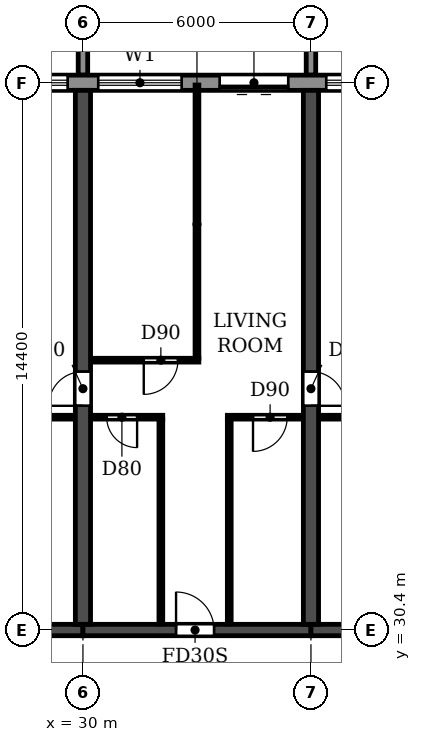
"""IFC4 building model, lengths in metres.
Left out: names, types, materials, properties, quantities, classifications, styles, units other than length and angle.
Written with IfcOpenShell. Run it as: python <this file> out.ifc"""

import sys

from ifc_helpers import new_model, si_unit, direction, frame, frame_2d, origin, place, context, subcontext, project, spatial, polyline, rectangle, outline, extrude, source, transform, mapped, element, fill, save


model = new_model("IFC4")
c1 = context("Model", 3, precision=1e-05, world=origin(), true_north=direction((0.0, 1.0)))
c2 = subcontext(c1, "Body", "Model", "MODEL_VIEW")
j1 = project(units=[si_unit("LENGTHUNIT", "METRE"), si_unit("PLANEANGLEUNIT", "RADIAN")], contexts=[c1])
p1 = place(None, origin())
s1 = spatial("IfcSite", under=j1, at=p1, CompositionType="ELEMENT")
p2 = place(p1, origin())
s2 = spatial("IfcBuilding", under=s1, at=p2, CompositionType="ELEMENT")
p3 = place(p2, frame((0.0, 0.0, 49.8)))
s3 = spatial("IfcBuildingStorey", under=s2, at=p3, CompositionType="ELEMENT", Elevation=49.8)
p4 = place(p3, frame((30.0, 30.55, 0.0), z_axis=(0.0, 0.0, 1.0), x_axis=(0.0, 1.0, 0.0)))
e1 = element("IfcWall", 1, at=p4, inside=s3, PredefinedType="SHEAR", context=c2, shape_type="SweptSolid", body=[
    extrude(rectangle(XDim=14.05, YDim=0.4, at=frame_2d((7.025, 0.0))), origin(), (0.0, 0.0, 1.0), 3.0),
])
p5 = place(p4, frame((5.75, 0.0, 0.0)))
e2 = element("IfcOpeningElement", 2, at=p5, cuts=e1, PredefinedType="OPENING", context=c2, shape_type="SweptSolid", body=[
    extrude(rectangle(XDim=0.9, YDim=2.1, at=frame_2d((0.45, 1.05))), frame((0.0, 0.21, 0.0), z_axis=(0.0, -1.0, 0.0), x_axis=(1.0, 0.0, 0.0)), (0.0, 0.0, 1.0), 0.42),
])
p6 = place(p3, frame((36.0, 30.55, 0.0), z_axis=(0.0, 0.0, 1.0), x_axis=(0.0, 1.0, 0.0)))
e3 = element("IfcWall", 3, at=p6, inside=s3, PredefinedType="SHEAR", context=c2, shape_type="SweptSolid", body=[
    extrude(rectangle(XDim=14.05, YDim=0.4, at=frame_2d((7.025, 0.0))), origin(), (0.0, 0.0, 1.0), 3.0),
])
p7 = place(p6, frame((5.75, 0.0, 0.0)))
e4 = element("IfcOpeningElement", 4, at=p7, cuts=e3, PredefinedType="OPENING", context=c2, shape_type="SweptSolid", body=[
    extrude(rectangle(XDim=0.9, YDim=2.1, at=frame_2d((0.45, 1.05))), frame((0.0, 0.21, 0.0), z_axis=(0.0, -1.0, 0.0), x_axis=(1.0, 0.0, 0.0)), (0.0, 0.0, 1.0), 0.42),
])
p8 = place(p3, frame((24.0, 30.4, 0.0), z_axis=(0.0, 0.0, 1.0), x_axis=(1.0, 0.0, 0.0)))
e5 = element("IfcWall", 5, at=p8, inside=s3, PredefinedType="SHEAR", context=c2, shape_type="SweptSolid", body=[
    extrude(rectangle(XDim=6.0, YDim=0.3, at=frame_2d((3.0, 0.0))), origin(), (0.0, 0.0, 1.0), 2.4),
])
p9 = place(p3, frame((30.0, 30.4, 0.0), z_axis=(0.0, 0.0, 1.0), x_axis=(1.0, 0.0, 0.0)))
e6 = element("IfcWall", 6, at=p9, inside=s3, PredefinedType="SHEAR", context=c2, shape_type="SweptSolid", body=[
    extrude(rectangle(XDim=6.0, YDim=0.3, at=frame_2d((3.0, 0.0))), origin(), (0.0, 0.0, 1.0), 2.4),
])
p10 = place(p9, frame((2.45, 0.0, 0.0)))
e7 = element("IfcOpeningElement", 7, at=p10, cuts=e6, PredefinedType="OPENING", context=c2, shape_type="SweptSolid", body=[
    extrude(rectangle(XDim=1.0, YDim=2.1, at=frame_2d((0.5, 1.05))), frame((0.0, 0.16, 0.0), z_axis=(0.0, -1.0, 0.0), x_axis=(1.0, 0.0, 0.0)), (0.0, 0.0, 1.0), 0.32),
])
p11 = place(p3, frame((36.0, 30.4, 0.0), z_axis=(0.0, 0.0, 1.0), x_axis=(1.0, 0.0, 0.0)))
e8 = element("IfcWall", 8, at=p11, inside=s3, PredefinedType="SHEAR", context=c2, shape_type="SweptSolid", body=[
    extrude(rectangle(XDim=6.0, YDim=0.3, at=frame_2d((3.0, 0.0))), origin(), (0.0, 0.0, 1.0), 2.4),
])
p12 = place(p3, frame((97.317, 44.8, 0.0), z_axis=(0.0, 0.0, 1.0), x_axis=(-1.0, 0.0, 0.0)))
e9 = element("IfcWall", 9, at=p12, inside=s3, PredefinedType="STANDARD", context=c2, shape_type="SweptSolid", body=[
    extrude(rectangle(XDim=92.634, YDim=0.4, at=frame_2d((46.317, 0.0))), origin(), (0.0, 0.0, 1.0), 3.0),
])
p13 = place(p12, frame((88.917, 0.0, 0.0)))
e10 = element("IfcOpeningElement", 10, at=p13, cuts=e9, PredefinedType="OPENING", context=c2, shape_type="SweptSolid", body=[
    extrude(rectangle(XDim=1.8, YDim=2.4, at=frame_2d((0.9, 1.2))), frame((0.0, 0.21, 0.0), z_axis=(0.0, -1.0, 0.0), x_axis=(1.0, 0.0, 0.0)), (0.0, 0.0, 1.0), 0.42),
])
p14 = place(p12, frame((85.717, 0.0, 0.9)))
e11 = element("IfcOpeningElement", 11, at=p14, cuts=e9, PredefinedType="OPENING", context=c2, shape_type="SweptSolid", body=[
    extrude(rectangle(XDim=2.2, YDim=1.5, at=frame_2d((1.1, 0.75))), frame((0.0, 0.21, 0.0), z_axis=(0.0, -1.0, 0.0), x_axis=(1.0, 0.0, 0.0)), (0.0, 0.0, 1.0), 0.42),
])
p15 = place(p12, frame((82.717, 0.0, 0.9)))
e12 = element("IfcOpeningElement", 12, at=p15, cuts=e9, PredefinedType="OPENING", context=c2, shape_type="SweptSolid", body=[
    extrude(rectangle(XDim=2.2, YDim=1.5, at=frame_2d((1.1, 0.75))), frame((0.0, 0.21, 0.0), z_axis=(0.0, -1.0, 0.0), x_axis=(1.0, 0.0, 0.0)), (0.0, 0.0, 1.0), 0.42),
])
p16 = place(p12, frame((79.717, 0.0, 0.9)))
e13 = element("IfcOpeningElement", 13, at=p16, cuts=e9, PredefinedType="OPENING", context=c2, shape_type="SweptSolid", body=[
    extrude(rectangle(XDim=2.2, YDim=1.5, at=frame_2d((1.1, 0.75))), frame((0.0, 0.21, 0.0), z_axis=(0.0, -1.0, 0.0), x_axis=(1.0, 0.0, 0.0)), (0.0, 0.0, 1.0), 0.42),
])
p17 = place(p12, frame((76.717, 0.0, 0.9)))
e14 = element("IfcOpeningElement", 14, at=p17, cuts=e9, PredefinedType="OPENING", context=c2, shape_type="SweptSolid", body=[
    extrude(rectangle(XDim=2.2, YDim=1.5, at=frame_2d((1.1, 0.75))), frame((0.0, 0.21, 0.0), z_axis=(0.0, -1.0, 0.0), x_axis=(1.0, 0.0, 0.0)), (0.0, 0.0, 1.0), 0.42),
])
p18 = place(p12, frame((73.917, 0.0, 0.0)))
e15 = element("IfcOpeningElement", 15, at=p18, cuts=e9, PredefinedType="OPENING", context=c2, shape_type="SweptSolid", body=[
    extrude(rectangle(XDim=1.8, YDim=2.4, at=frame_2d((0.9, 1.2))), frame((0.0, 0.21, 0.0), z_axis=(0.0, -1.0, 0.0), x_axis=(1.0, 0.0, 0.0)), (0.0, 0.0, 1.0), 0.42),
])
p19 = place(p12, frame((70.717, 0.0, 0.9)))
e16 = element("IfcOpeningElement", 16, at=p19, cuts=e9, PredefinedType="OPENING", context=c2, shape_type="SweptSolid", body=[
    extrude(rectangle(XDim=2.2, YDim=1.5, at=frame_2d((1.1, 0.75))), frame((0.0, 0.21, 0.0), z_axis=(0.0, -1.0, 0.0), x_axis=(1.0, 0.0, 0.0)), (0.0, 0.0, 1.0), 0.42),
])
p20 = place(p12, frame((67.717, 0.0, 0.9)))
e17 = element("IfcOpeningElement", 17, at=p20, cuts=e9, PredefinedType="OPENING", context=c2, shape_type="SweptSolid", body=[
    extrude(rectangle(XDim=2.2, YDim=1.5, at=frame_2d((1.1, 0.75))), frame((0.0, 0.21, 0.0), z_axis=(0.0, -1.0, 0.0), x_axis=(1.0, 0.0, 0.0)), (0.0, 0.0, 1.0), 0.42),
])
p21 = place(p12, frame((64.717, 0.0, 0.9)))
e18 = element("IfcOpeningElement", 18, at=p21, cuts=e9, PredefinedType="OPENING", context=c2, shape_type="SweptSolid", body=[
    extrude(rectangle(XDim=2.2, YDim=1.5, at=frame_2d((1.1, 0.75))), frame((0.0, 0.21, 0.0), z_axis=(0.0, -1.0, 0.0), x_axis=(1.0, 0.0, 0.0)), (0.0, 0.0, 1.0), 0.42),
])
p22 = place(p12, frame((61.917, 0.0, 0.0)))
e19 = element("IfcOpeningElement", 19, at=p22, cuts=e9, PredefinedType="OPENING", context=c2, shape_type="SweptSolid", body=[
    extrude(rectangle(XDim=1.8, YDim=2.4, at=frame_2d((0.9, 1.2))), frame((0.0, 0.21, 0.0), z_axis=(0.0, -1.0, 0.0), x_axis=(1.0, 0.0, 0.0)), (0.0, 0.0, 1.0), 0.42),
])
p23 = place(p12, frame((58.717, 0.0, 0.9)))
e20 = element("IfcOpeningElement", 20, at=p23, cuts=e9, PredefinedType="OPENING", context=c2, shape_type="SweptSolid", body=[
    extrude(rectangle(XDim=2.2, YDim=1.5, at=frame_2d((1.1, 0.75))), frame((0.0, 0.21, 0.0), z_axis=(0.0, -1.0, 0.0), x_axis=(1.0, 0.0, 0.0)), (0.0, 0.0, 1.0), 0.42),
])
p24 = place(p12, frame((55.717, 0.0, 0.9)))
e21 = element("IfcOpeningElement", 21, at=p24, cuts=e9, PredefinedType="OPENING", context=c2, shape_type="SweptSolid", body=[
    extrude(rectangle(XDim=2.2, YDim=1.5, at=frame_2d((1.1, 0.75))), frame((0.0, 0.21, 0.0), z_axis=(0.0, -1.0, 0.0), x_axis=(1.0, 0.0, 0.0)), (0.0, 0.0, 1.0), 0.42),
])
p25 = place(p12, frame((52.717, 0.0, 0.9)))
e22 = element("IfcOpeningElement", 22, at=p25, cuts=e9, PredefinedType="OPENING", context=c2, shape_type="SweptSolid", body=[
    extrude(rectangle(XDim=2.2, YDim=1.5, at=frame_2d((1.1, 0.75))), frame((0.0, 0.21, 0.0), z_axis=(0.0, -1.0, 0.0), x_axis=(1.0, 0.0, 0.0)), (0.0, 0.0, 1.0), 0.42),
])
p26 = place(p12, frame((49.917, 0.0, 0.0)))
e23 = element("IfcOpeningElement", 23, at=p26, cuts=e9, PredefinedType="OPENING", context=c2, shape_type="SweptSolid", body=[
    extrude(rectangle(XDim=1.8, YDim=2.4, at=frame_2d((0.9, 1.2))), frame((0.0, 0.21, 0.0), z_axis=(0.0, -1.0, 0.0), x_axis=(1.0, 0.0, 0.0)), (0.0, 0.0, 1.0), 0.42),
])
p27 = place(p12, frame((46.717, 0.0, 0.9)))
e24 = element("IfcOpeningElement", 24, at=p27, cuts=e9, PredefinedType="OPENING", context=c2, shape_type="SweptSolid", body=[
    extrude(rectangle(XDim=2.2, YDim=1.5, at=frame_2d((1.1, 0.75))), frame((0.0, 0.21, 0.0), z_axis=(0.0, -1.0, 0.0), x_axis=(1.0, 0.0, 0.0)), (0.0, 0.0, 1.0), 0.42),
])
p28 = place(p12, frame((43.717, 0.0, 0.9)))
e25 = element("IfcOpeningElement", 25, at=p28, cuts=e9, PredefinedType="OPENING", context=c2, shape_type="SweptSolid", body=[
    extrude(rectangle(XDim=2.2, YDim=1.5, at=frame_2d((1.1, 0.75))), frame((0.0, 0.21, 0.0), z_axis=(0.0, -1.0, 0.0), x_axis=(1.0, 0.0, 0.0)), (0.0, 0.0, 1.0), 0.42),
])
p29 = place(p12, frame((40.717, 0.0, 0.9)))
e26 = element("IfcOpeningElement", 26, at=p29, cuts=e9, PredefinedType="OPENING", context=c2, shape_type="SweptSolid", body=[
    extrude(rectangle(XDim=2.2, YDim=1.5, at=frame_2d((1.1, 0.75))), frame((0.0, 0.21, 0.0), z_axis=(0.0, -1.0, 0.0), x_axis=(1.0, 0.0, 0.0)), (0.0, 0.0, 1.0), 0.42),
])
p30 = place(p12, frame((37.917, 0.0, 0.0)))
e27 = element("IfcOpeningElement", 27, at=p30, cuts=e9, PredefinedType="OPENING", context=c2, shape_type="SweptSolid", body=[
    extrude(rectangle(XDim=1.8, YDim=2.4, at=frame_2d((0.9, 1.2))), frame((0.0, 0.21, 0.0), z_axis=(0.0, -1.0, 0.0), x_axis=(1.0, 0.0, 0.0)), (0.0, 0.0, 1.0), 0.42),
])
p31 = place(p12, frame((34.717, 0.0, 0.9)))
e28 = element("IfcOpeningElement", 28, at=p31, cuts=e9, PredefinedType="OPENING", context=c2, shape_type="SweptSolid", body=[
    extrude(rectangle(XDim=2.2, YDim=1.5, at=frame_2d((1.1, 0.75))), frame((0.0, 0.21, 0.0), z_axis=(0.0, -1.0, 0.0), x_axis=(1.0, 0.0, 0.0)), (0.0, 0.0, 1.0), 0.42),
])
p32 = place(p12, frame((31.717, 0.0, 0.9)))
e29 = element("IfcOpeningElement", 29, at=p32, cuts=e9, PredefinedType="OPENING", context=c2, shape_type="SweptSolid", body=[
    extrude(rectangle(XDim=2.2, YDim=1.5, at=frame_2d((1.1, 0.75))), frame((0.0, 0.21, 0.0), z_axis=(0.0, -1.0, 0.0), x_axis=(1.0, 0.0, 0.0)), (0.0, 0.0, 1.0), 0.42),
])
p33 = place(p12, frame((28.717, 0.0, 0.9)))
e30 = element("IfcOpeningElement", 30, at=p33, cuts=e9, PredefinedType="OPENING", context=c2, shape_type="SweptSolid", body=[
    extrude(rectangle(XDim=2.2, YDim=1.5, at=frame_2d((1.1, 0.75))), frame((0.0, 0.21, 0.0), z_axis=(0.0, -1.0, 0.0), x_axis=(1.0, 0.0, 0.0)), (0.0, 0.0, 1.0), 0.42),
])
p34 = place(p12, frame((25.917, 0.0, 0.0)))
e31 = element("IfcOpeningElement", 31, at=p34, cuts=e9, PredefinedType="OPENING", context=c2, shape_type="SweptSolid", body=[
    extrude(rectangle(XDim=1.8, YDim=2.4, at=frame_2d((0.9, 1.2))), frame((0.0, 0.21, 0.0), z_axis=(0.0, -1.0, 0.0), x_axis=(1.0, 0.0, 0.0)), (0.0, 0.0, 1.0), 0.42),
])
p35 = place(p12, frame((22.917, 0.0, 0.0)))
e32 = element("IfcOpeningElement", 32, at=p35, cuts=e9, PredefinedType="OPENING", context=c2, shape_type="SweptSolid", body=[
    extrude(rectangle(XDim=1.8, YDim=2.4, at=frame_2d((0.9, 1.2))), frame((0.0, 0.21, 0.0), z_axis=(0.0, -1.0, 0.0), x_axis=(1.0, 0.0, 0.0)), (0.0, 0.0, 1.0), 0.42),
])
p36 = place(p12, frame((19.717, 0.0, 0.9)))
e33 = element("IfcOpeningElement", 33, at=p36, cuts=e9, PredefinedType="OPENING", context=c2, shape_type="SweptSolid", body=[
    extrude(rectangle(XDim=2.2, YDim=1.5, at=frame_2d((1.1, 0.75))), frame((0.0, 0.21, 0.0), z_axis=(0.0, -1.0, 0.0), x_axis=(1.0, 0.0, 0.0)), (0.0, 0.0, 1.0), 0.42),
])
p37 = place(p12, frame((16.717, 0.0, 0.9)))
e34 = element("IfcOpeningElement", 34, at=p37, cuts=e9, PredefinedType="OPENING", context=c2, shape_type="SweptSolid", body=[
    extrude(rectangle(XDim=2.2, YDim=1.5, at=frame_2d((1.1, 0.75))), frame((0.0, 0.21, 0.0), z_axis=(0.0, -1.0, 0.0), x_axis=(1.0, 0.0, 0.0)), (0.0, 0.0, 1.0), 0.42),
])
p38 = place(p12, frame((13.717, 0.0, 0.9)))
e35 = element("IfcOpeningElement", 35, at=p38, cuts=e9, PredefinedType="OPENING", context=c2, shape_type="SweptSolid", body=[
    extrude(rectangle(XDim=2.2, YDim=1.5, at=frame_2d((1.1, 0.75))), frame((0.0, 0.21, 0.0), z_axis=(0.0, -1.0, 0.0), x_axis=(1.0, 0.0, 0.0)), (0.0, 0.0, 1.0), 0.42),
])
p39 = place(p12, frame((10.717, 0.0, 0.9)))
e36 = element("IfcOpeningElement", 36, at=p39, cuts=e9, PredefinedType="OPENING", context=c2, shape_type="SweptSolid", body=[
    extrude(rectangle(XDim=2.2, YDim=1.5, at=frame_2d((1.1, 0.75))), frame((0.0, 0.21, 0.0), z_axis=(0.0, -1.0, 0.0), x_axis=(1.0, 0.0, 0.0)), (0.0, 0.0, 1.0), 0.42),
])
p40 = place(p12, frame((7.917, 0.0, 0.0)))
e37 = element("IfcOpeningElement", 37, at=p40, cuts=e9, PredefinedType="OPENING", context=c2, shape_type="SweptSolid", body=[
    extrude(rectangle(XDim=1.8, YDim=2.4, at=frame_2d((0.9, 1.2))), frame((0.0, 0.21, 0.0), z_axis=(0.0, -1.0, 0.0), x_axis=(1.0, 0.0, 0.0)), (0.0, 0.0, 1.0), 0.42),
])
p41 = place(p12, frame((4.717, 0.0, 0.9)))
e38 = element("IfcOpeningElement", 38, at=p41, cuts=e9, PredefinedType="OPENING", context=c2, shape_type="SweptSolid", body=[
    extrude(rectangle(XDim=2.2, YDim=1.5, at=frame_2d((1.1, 0.75))), frame((0.0, 0.21, 0.0), z_axis=(0.0, -1.0, 0.0), x_axis=(1.0, 0.0, 0.0)), (0.0, 0.0, 1.0), 0.42),
])
p42 = place(p12, frame((1.917, 0.0, 0.0)))
e39 = element("IfcOpeningElement", 39, at=p42, cuts=e9, PredefinedType="OPENING", context=c2, shape_type="SweptSolid", body=[
    extrude(rectangle(XDim=1.8, YDim=2.4, at=frame_2d((0.9, 1.2))), frame((0.0, 0.21, 0.0), z_axis=(0.0, -1.0, 0.0), x_axis=(1.0, 0.0, 0.0)), (0.0, 0.0, 1.0), 0.42),
])
m1 = source(origin(), c2, "Body", "SweptSolid", [
    extrude(outline(polyline([(0.0, 0.0), (0.25, 0.0), (0.25, 3.1), (0.0, 3.1), (0.0, 0.0)])), origin(), (0.0, 0.0, 1.0), 3.1),
])
for number, where in (
    (40, (29.875, 45.0, 0.0)),
    (41, (35.875, 45.0, 0.0)),
):
    element("IfcWall", number, at=place(p3, frame(where)), inside=s3, PredefinedType="STANDARD", context=c2, shape_type="MappedRepresentation", body=[
        mapped(m1, transform((0.0, 0.0, 0.0))),
    ])
p43 = place(p3, frame((27.1, 36.0, 0.0), z_axis=(0.0, 0.0, 1.0), x_axis=(1.0, 0.0, 0.0)))
e42 = element("IfcWall", 42, at=p43, inside=s3, PredefinedType="PARTITIONING", context=c2, shape_type="SweptSolid", body=[
    extrude(rectangle(XDim=2.69, YDim=0.1, at=frame_2d((1.345, 0.0))), origin(), (0.0, 0.0, 1.0), 3.0),
])
p44 = place(p43, frame((1.0, 0.0, 0.0)))
e43 = element("IfcOpeningElement", 43, at=p44, cuts=e42, PredefinedType="OPENING", context=c2, shape_type="SweptSolid", body=[
    extrude(rectangle(XDim=0.8, YDim=2.1, at=frame_2d((0.4, 1.05))), frame((0.0, 0.06, 0.0), z_axis=(0.0, -1.0, 0.0), x_axis=(1.0, 0.0, 0.0)), (0.0, 0.0, 1.0), 0.12),
])
p45 = place(p3, frame((30.21, 36.0, 0.0), z_axis=(0.0, 0.0, 1.0), x_axis=(1.0, 0.0, 0.0)))
e44 = element("IfcWall", 44, at=p45, inside=s3, PredefinedType="PARTITIONING", context=c2, shape_type="SweptSolid", body=[
    extrude(rectangle(XDim=1.89, YDim=0.1, at=frame_2d((0.945, 0.0))), origin(), (0.0, 0.0, 1.0), 3.0),
])
p46 = place(p45, frame((0.415, 0.0, 0.0)))
e45 = element("IfcOpeningElement", 45, at=p46, cuts=e44, PredefinedType="OPENING", context=c2, shape_type="SweptSolid", body=[
    extrude(rectangle(XDim=0.8, YDim=2.1, at=frame_2d((0.4, 1.05))), frame((0.0, 0.06, 0.0), z_axis=(0.0, -1.0, 0.0), x_axis=(1.0, 0.0, 0.0)), (0.0, 0.0, 1.0), 0.12),
])
p47 = place(p3, frame((33.8, 36.0, 0.0), z_axis=(0.0, 0.0, 1.0), x_axis=(1.0, 0.0, 0.0)))
e46 = element("IfcWall", 46, at=p47, inside=s3, PredefinedType="PARTITIONING", context=c2, shape_type="SweptSolid", body=[
    extrude(rectangle(XDim=1.99, YDim=0.1, at=frame_2d((0.995, 0.0))), origin(), (0.0, 0.0, 1.0), 3.0),
])
p48 = place(p47, frame((0.675, 0.0, 0.0)))
e47 = element("IfcOpeningElement", 47, at=p48, cuts=e46, PredefinedType="OPENING", context=c2, shape_type="SweptSolid", body=[
    extrude(rectangle(XDim=0.9, YDim=2.1, at=frame_2d((0.45, 1.05))), frame((0.0, 0.06, 0.0), z_axis=(0.0, -1.0, 0.0), x_axis=(1.0, 0.0, 0.0)), (0.0, 0.0, 1.0), 0.12),
])
p49 = place(p3, frame((36.21, 36.0, 0.0), z_axis=(0.0, 0.0, 1.0), x_axis=(1.0, 0.0, 0.0)))
e48 = element("IfcWall", 48, at=p49, inside=s3, PredefinedType="PARTITIONING", context=c2, shape_type="SweptSolid", body=[
    extrude(rectangle(XDim=2.69, YDim=0.1, at=frame_2d((1.345, 0.0))), origin(), (0.0, 0.0, 1.0), 3.0),
])
p50 = place(p49, frame((0.89, 0.0, 0.0)))
e49 = element("IfcOpeningElement", 49, at=p50, cuts=e48, PredefinedType="OPENING", context=c2, shape_type="SweptSolid", body=[
    extrude(rectangle(XDim=0.8, YDim=2.1, at=frame_2d((0.4, 1.05))), frame((0.0, 0.06, 0.0), z_axis=(0.0, -1.0, 0.0), x_axis=(1.0, 0.0, 0.0)), (0.0, 0.0, 1.0), 0.12),
])
p51 = place(p3, frame((30.21, 37.5, 0.0), z_axis=(0.0, 0.0, 1.0), x_axis=(1.0, 0.0, 0.0)))
e50 = element("IfcWall", 50, at=p51, inside=s3, PredefinedType="PARTITIONING", context=c2, shape_type="SweptSolid", body=[
    extrude(rectangle(XDim=2.84, YDim=0.1, at=frame_2d((1.42, 0.0))), origin(), (0.0, 0.0, 1.0), 3.0),
])
p52 = place(p51, frame((1.39, 0.0, 0.0)))
e51 = element("IfcOpeningElement", 51, at=p52, cuts=e50, PredefinedType="OPENING", context=c2, shape_type="SweptSolid", body=[
    extrude(rectangle(XDim=0.9, YDim=2.1, at=frame_2d((0.45, 1.05))), frame((0.0, 0.06, 0.0), z_axis=(0.0, -1.0, 0.0), x_axis=(1.0, 0.0, 0.0)), (0.0, 0.0, 1.0), 0.12),
])
p53 = place(p3, frame((32.05, 30.56, 0.0), z_axis=(0.0, 0.0, 1.0), x_axis=(0.0, 1.0, 0.0)))
e52 = element("IfcWall", 52, at=p53, inside=s3, PredefinedType="PARTITIONING", context=c2, shape_type="SweptSolid", body=[
    extrude(rectangle(XDim=5.39, YDim=0.1, at=frame_2d((2.695, 0.0))), origin(), (0.0, 0.0, 1.0), 3.0),
])
p54 = place(p3, frame((33.0, 37.55, 0.0), z_axis=(0.0, 0.0, 1.0), x_axis=(0.0, 1.0, 0.0)))
e53 = element("IfcWall", 53, at=p54, inside=s3, PredefinedType="PARTITIONING", context=c2, shape_type="SweptSolid", body=[
    extrude(rectangle(XDim=7.19, YDim=0.1, at=frame_2d((3.595, 0.0))), origin(), (0.0, 0.0, 1.0), 3.0),
])
p55 = place(p3, frame((33.85, 30.56, 0.0), z_axis=(0.0, 0.0, 1.0), x_axis=(0.0, 1.0, 0.0)))
e54 = element("IfcWall", 54, at=p55, inside=s3, PredefinedType="PARTITIONING", context=c2, shape_type="SweptSolid", body=[
    extrude(rectangle(XDim=5.39, YDim=0.1, at=frame_2d((2.695, 0.0))), origin(), (0.0, 0.0, 1.0), 3.0),
])
p56 = place(p20, origin())
e55 = element("IfcWindow", 55, at=p56, inside=s3, PartitioningType="DOUBLE_PANEL_HORIZONTAL", PredefinedType="WINDOW", context=c2, shape_type="SweptSolid", body=[
    extrude(rectangle(XDim=2.2, YDim=1.5, at=frame_2d((1.1, 0.75))), frame((0.0, 0.03, 0.0), z_axis=(0.0, -1.0, 0.0), x_axis=(1.0, 0.0, 0.0)), (0.0, 0.0, 1.0), 0.06),
])
fill(e17, e55)
p57 = place(p21, origin())
e56 = element("IfcWindow", 56, at=p57, inside=s3, PartitioningType="DOUBLE_PANEL_HORIZONTAL", PredefinedType="WINDOW", context=c2, shape_type="SweptSolid", body=[
    extrude(rectangle(XDim=2.2, YDim=1.5, at=frame_2d((1.1, 0.75))), frame((0.0, 0.03, 0.0), z_axis=(0.0, -1.0, 0.0), x_axis=(1.0, 0.0, 0.0)), (0.0, 0.0, 1.0), 0.06),
])
fill(e18, e56)
p58 = place(p22, origin())
e57 = element("IfcDoor", 57, at=p58, inside=s3, OperationType="DOUBLE_DOOR_SLIDING", PredefinedType="DOOR", context=c2, shape_type="SweptSolid", body=[
    extrude(rectangle(XDim=1.8, YDim=2.4, at=frame_2d((0.9, 1.2))), frame((0.0, 0.025, 0.0), z_axis=(0.0, -1.0, 0.0), x_axis=(1.0, 0.0, 0.0)), (0.0, 0.0, 1.0), 0.05),
])
fill(e19, e57)
p59 = place(p23, origin())
e58 = element("IfcWindow", 58, at=p59, inside=s3, PartitioningType="DOUBLE_PANEL_HORIZONTAL", PredefinedType="WINDOW", context=c2, shape_type="SweptSolid", body=[
    extrude(rectangle(XDim=2.2, YDim=1.5, at=frame_2d((1.1, 0.75))), frame((0.0, 0.03, 0.0), z_axis=(0.0, -1.0, 0.0), x_axis=(1.0, 0.0, 0.0)), (0.0, 0.0, 1.0), 0.06),
])
fill(e20, e58)
p60 = place(p5, origin())
e59 = element("IfcDoor", 59, at=p60, inside=s3, OperationType="SINGLE_SWING_LEFT", PredefinedType="DOOR", context=c2, shape_type="SweptSolid", body=[
    extrude(rectangle(XDim=0.9, YDim=2.1, at=frame_2d((0.45, 1.05))), frame((0.0, 0.025, 0.0), z_axis=(0.0, -1.0, 0.0), x_axis=(1.0, 0.0, 0.0)), (0.0, 0.0, 1.0), 0.05),
])
fill(e2, e59)
p61 = place(p46, frame((0.8, 0.0, 0.0), z_axis=(0.0, 0.0, 1.0), x_axis=(-1.0, 0.0, 0.0)))
e60 = element("IfcDoor", 60, at=p61, inside=s3, OperationType="SINGLE_SWING_LEFT", PredefinedType="DOOR", context=c2, shape_type="SweptSolid", body=[
    extrude(rectangle(XDim=0.8, YDim=2.1, at=frame_2d((0.4, 1.05))), frame((0.0, 0.025, 0.0), z_axis=(0.0, -1.0, 0.0), x_axis=(1.0, 0.0, 0.0)), (0.0, 0.0, 1.0), 0.05),
])
fill(e45, e60)
p62 = place(p52, frame((0.9, 0.0, 0.0), z_axis=(0.0, 0.0, 1.0), x_axis=(-1.0, 0.0, 0.0)))
e61 = element("IfcDoor", 61, at=p62, inside=s3, OperationType="SINGLE_SWING_RIGHT", PredefinedType="DOOR", context=c2, shape_type="SweptSolid", body=[
    extrude(rectangle(XDim=0.9, YDim=2.1, at=frame_2d((0.45, 1.05))), frame((0.0, 0.025, 0.0), z_axis=(0.0, -1.0, 0.0), x_axis=(1.0, 0.0, 0.0)), (0.0, 0.0, 1.0), 0.05),
])
fill(e51, e61)
p63 = place(p10, origin())
e62 = element("IfcDoor", 62, at=p63, inside=s3, OperationType="SINGLE_SWING_LEFT", PredefinedType="DOOR", context=c2, shape_type="SweptSolid", body=[
    extrude(rectangle(XDim=1.0, YDim=2.1, at=frame_2d((0.5, 1.05))), frame((0.0, 0.025, 0.0), z_axis=(0.0, -1.0, 0.0), x_axis=(1.0, 0.0, 0.0)), (0.0, 0.0, 1.0), 0.05),
])
fill(e7, e62)
p64 = place(p48, frame((0.9, 0.0, 0.0), z_axis=(0.0, 0.0, 1.0), x_axis=(-1.0, 0.0, 0.0)))
e63 = element("IfcDoor", 63, at=p64, inside=s3, OperationType="SINGLE_SWING_RIGHT", PredefinedType="DOOR", context=c2, shape_type="SweptSolid", body=[
    extrude(rectangle(XDim=0.9, YDim=2.1, at=frame_2d((0.45, 1.05))), frame((0.0, 0.025, 0.0), z_axis=(0.0, -1.0, 0.0), x_axis=(1.0, 0.0, 0.0)), (0.0, 0.0, 1.0), 0.05),
])
fill(e47, e63)
p65 = place(p7, frame((0.9, 0.0, 0.0), z_axis=(0.0, 0.0, 1.0), x_axis=(-1.0, 0.0, 0.0)))
e64 = element("IfcDoor", 64, at=p65, inside=s3, OperationType="SINGLE_SWING_RIGHT", PredefinedType="DOOR", context=c2, shape_type="SweptSolid", body=[
    extrude(rectangle(XDim=0.9, YDim=2.1, at=frame_2d((0.45, 1.05))), frame((0.0, 0.025, 0.0), z_axis=(0.0, -1.0, 0.0), x_axis=(1.0, 0.0, 0.0)), (0.0, 0.0, 1.0), 0.05),
])
fill(e4, e64)
save(model, sys.argv[1])
